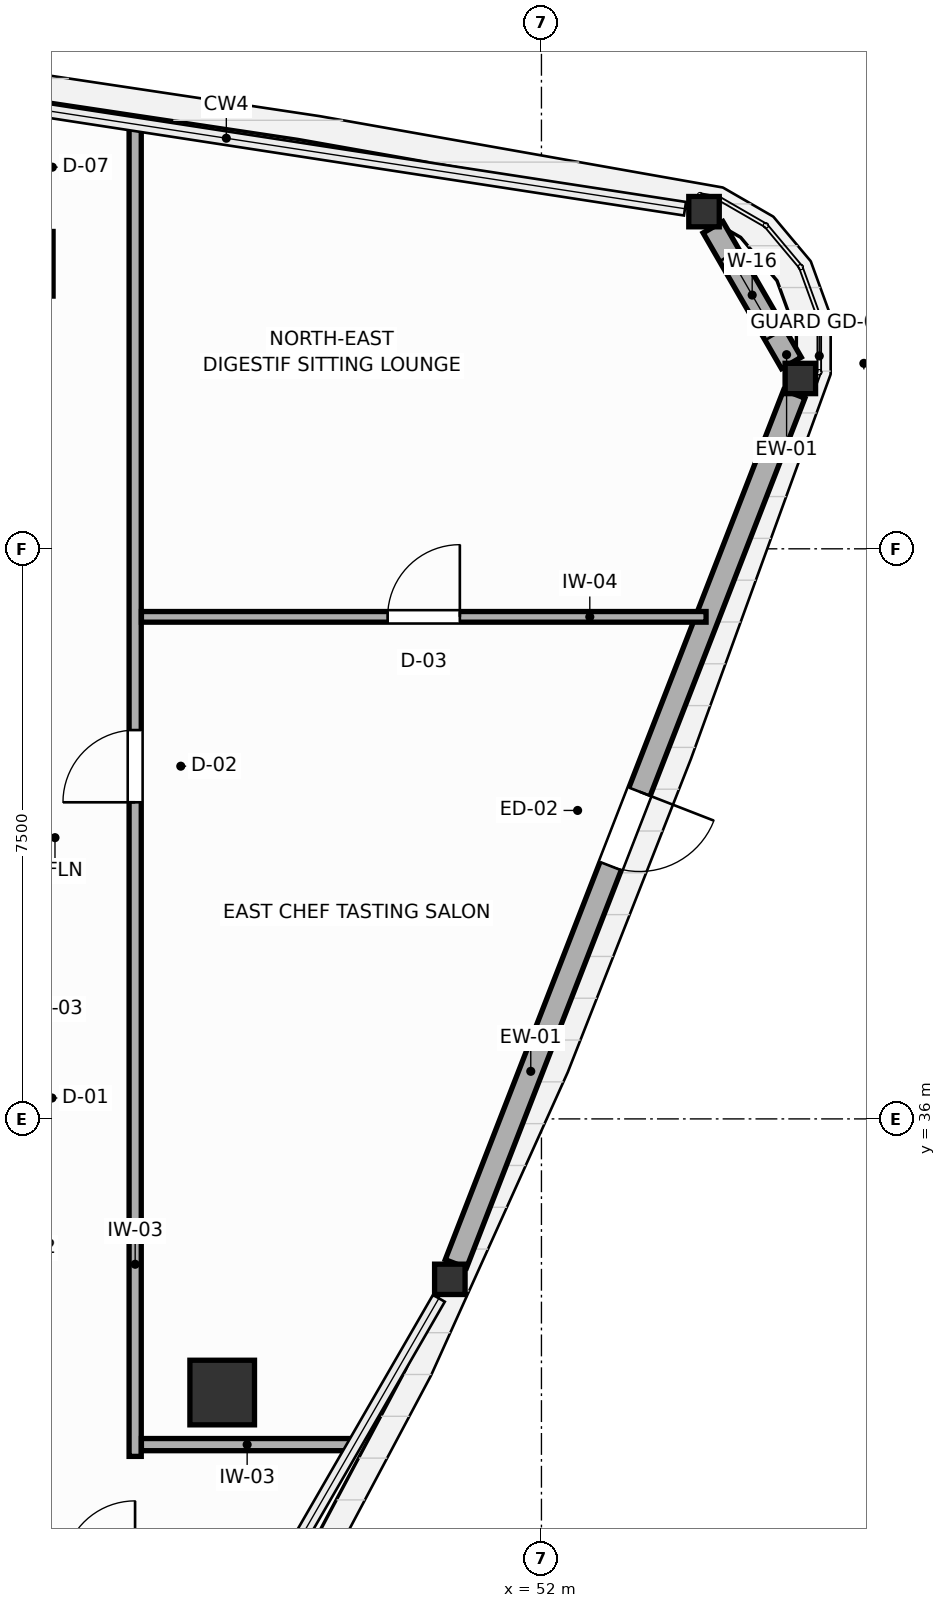
"""IFC4 building model, lengths in metres.
Left out: names, types, materials, properties, quantities, classifications, styles, units other than length and angle.
Written with IfcOpenShell. Run it as: python <this file> out.ifc"""

import sys

from ifc_helpers import new_model, si_unit, direction, frame, frame_2d, origin, origin_2d, place, context, subcontext, project, spatial, rectangle, i_section, extrude, source, transform, mapped, element, fill, save


model = new_model("IFC4")
c1 = context("Model", 3, precision=1e-05, world=origin(), true_north=direction((0.0, 1.0)))
c2 = subcontext(c1, "Body", "Model", "MODEL_VIEW")
j1 = project(units=[si_unit("LENGTHUNIT", "METRE"), si_unit("PLANEANGLEUNIT", "RADIAN")], contexts=[c1])
p1 = place(None, origin())
s1 = spatial("IfcSite", under=j1, at=p1, CompositionType="ELEMENT")
p2 = place(p1, origin())
s2 = spatial("IfcBuilding", under=s1, at=p2, CompositionType="ELEMENT")
p3 = place(p2, frame((0.0, 0.0, 279.6)))
s3 = spatial("IfcBuildingStorey", under=s2, at=p3, CompositionType="ELEMENT", Elevation=279.6)
m1 = source(origin(), c2, "Body", "SweptSolid", [
    extrude(rectangle(XDim=0.85, YDim=0.85, at=origin_2d()), origin(), (0.0, 0.0, 1.0), 4.2),
])
for number, where, z_axis, x_axis in (
    (1, (45.15, 47.25, 0.0), (0.0, 0.0, 1.0), (1.0, 0.0, 0.0)),
    (2, (47.8, 32.4, 0.0), (0.0, 0.0, 1.0), (1.0, 0.0, 0.0)),
):
    element("IfcColumn", number, at=place(p3, frame(where, z_axis=z_axis, x_axis=x_axis)), inside=s3, PredefinedType="COLUMN", context=c2, shape_type="MappedRepresentation", body=[
        mapped(m1, transform((0.0, 0.0, 0.0), scale=1.0)),
    ])
m2 = source(origin(), c2, "Body", "SweptSolid", [
    extrude(i_section(OverallWidth=0.401, OverallDepth=0.399, WebThickness=0.022, FlangeThickness=0.036, FilletRadius=0.015, at=origin_2d()), origin(), (0.0, 0.0, 1.0), 4.2),
])
for number, where, z_axis, x_axis in (
    (3, (55.406, 45.741, 0.0), (0.0, 0.0, 1.0), (1.0, 0.0, 0.0)),
    (4, (54.139, 47.936, 0.0), (0.0, 0.0, 1.0), (1.0, 0.0, 0.0)),
    (5, (50.795, 33.889, 0.0), (0.0, 0.0, 1.0), (1.0, 0.0, 0.0)),
):
    element("IfcColumn", number, at=place(p3, frame(where, z_axis=z_axis, x_axis=x_axis)), inside=s3, PredefinedType="COLUMN", context=c2, shape_type="MappedRepresentation", body=[
        mapped(m2, transform((0.0, 0.0, 0.0), scale=1.0)),
    ])
p4 = place(p3, frame((55.288, 45.945, 0.0), z_axis=(0.0, 0.0, 1.0), x_axis=(-0.499883026796, 0.866092927763, 0.0)))
e6 = element("IfcWall", 6, at=p4, inside=s3, PredefinedType="SOLIDWALL", context=c2, shape_type="SweptSolid", body=[
    extrude(rectangle(XDim=2.062, YDim=0.3, at=frame_2d((1.031, 0.0))), origin(), (0.0, 0.0, 1.0), 2.52),
])
p5 = place(p4, frame((0.431, 0.0, 0.75)))
e7 = element("IfcOpeningElement", 7, at=p5, cuts=e6, PredefinedType="OPENING", context=c2, shape_type="SweptSolid", body=[
    extrude(rectangle(XDim=1.2, YDim=1.55, at=frame_2d((0.6, 0.775))), frame((0.0, 0.16, 0.0), z_axis=(0.0, -1.0, 0.0), x_axis=(1.0, 0.0, 0.0)), (0.0, 0.0, 1.0), 0.32),
])
p6 = place(p3, frame((50.874, 34.094, 0.0), z_axis=(0.0, 0.0, 1.0), x_axis=(0.362611301042, 0.931940472539, 0.0)))
e8 = element("IfcWall", 8, at=p6, inside=s3, PredefinedType="SOLIDWALL", context=c2, shape_type="SweptSolid", body=[
    extrude(rectangle(XDim=12.278, YDim=0.3, at=frame_2d((6.139, 0.0))), origin(), (0.0, 0.0, 1.0), 2.52),
])
p7 = place(p6, frame((5.614, 0.0, 0.0)))
e9 = element("IfcOpeningElement", 9, at=p7, cuts=e8, PredefinedType="OPENING", context=c2, shape_type="SweptSolid", body=[
    extrude(rectangle(XDim=1.05, YDim=2.1, at=frame_2d((0.525, 1.05))), frame((0.0, 0.16, 0.0), z_axis=(0.0, -1.0, 0.0), x_axis=(1.0, 0.0, 0.0)), (0.0, 0.0, 1.0), 0.32),
])
p8 = place(p3, frame((46.655, 31.56, 0.0), z_axis=(0.0, 0.0, 1.0), x_axis=(0.0, 1.0, 0.0)))
e10 = element("IfcWall", 10, at=p8, inside=s3, PredefinedType="PARTITIONING", context=c2, shape_type="SweptSolid", body=[
    extrude(rectangle(XDim=17.506, YDim=0.16, at=frame_2d((8.753, 0.0))), origin(), (0.0, 0.0, 1.0), 3.96),
])
p9 = place(p8, frame((8.605, 0.0, 0.0)))
e11 = element("IfcOpeningElement", 11, at=p9, cuts=e10, PredefinedType="OPENING", context=c2, shape_type="SweptSolid", body=[
    extrude(rectangle(XDim=0.95, YDim=2.05, at=frame_2d((0.475, 1.025))), frame((0.0, 0.09, 0.0), z_axis=(0.0, -1.0, 0.0), x_axis=(1.0, 0.0, 0.0)), (0.0, 0.0, 1.0), 0.18),
])
p10 = place(p3, frame((46.737, 31.715, 0.0), z_axis=(0.0, 0.0, 1.0), x_axis=(1.0, 0.0, 0.0)))
e12 = element("IfcWall", 12, at=p10, inside=s3, PredefinedType="PARTITIONING", context=c2, shape_type="SweptSolid", body=[
    extrude(rectangle(XDim=2.782, YDim=0.16, at=frame_2d((1.391, 0.0))), origin(), (0.0, 0.0, 1.0), 3.96),
])
p11 = place(p3, frame((46.737, 42.605, 0.0), z_axis=(0.0, 0.0, 1.0), x_axis=(1.0, 0.0, 0.0)))
e13 = element("IfcWall", 13, at=p11, inside=s3, PredefinedType="PARTITIONING", context=c2, shape_type="SweptSolid", body=[
    extrude(rectangle(XDim=7.429, YDim=0.14, at=frame_2d((3.714, 0.0))), origin(), (0.0, 0.0, 1.0), 3.96),
])
p12 = place(p11, frame((3.24, 0.0, 0.0)))
e14 = element("IfcOpeningElement", 14, at=p12, cuts=e13, PredefinedType="OPENING", context=c2, shape_type="SweptSolid", body=[
    extrude(rectangle(XDim=0.95, YDim=2.05, at=frame_2d((0.475, 1.025))), frame((0.0, 0.08, 0.0), z_axis=(0.0, -1.0, 0.0), x_axis=(1.0, 0.0, 0.0)), (0.0, 0.0, 1.0), 0.16),
])
p13 = place(p5, origin())
e15 = element("IfcWindow", 15, at=p13, inside=s3, PartitioningType="SINGLE_PANEL", PredefinedType="WINDOW", context=c2, shape_type="SweptSolid", body=[
    extrude(rectangle(XDim=1.2, YDim=1.55, at=frame_2d((0.6, 0.775))), frame((0.0, 0.03, 0.0), z_axis=(0.0, -1.0, 0.0), x_axis=(1.0, 0.0, 0.0)), (0.0, 0.0, 1.0), 0.06),
])
fill(e7, e15)
p14 = place(p7, frame((1.05, 0.0, 0.0), z_axis=(0.0, 0.0, 1.0), x_axis=(-1.0, 0.0, 0.0)))
e16 = element("IfcDoor", 16, at=p14, inside=s3, OperationType="SINGLE_SWING_LEFT", PredefinedType="DOOR", context=c2, shape_type="SweptSolid", body=[
    extrude(rectangle(XDim=1.05, YDim=2.1, at=frame_2d((0.525, 1.05))), frame((0.0, 0.025, 0.0), z_axis=(0.0, -1.0, 0.0), x_axis=(1.0, 0.0, 0.0)), (0.0, 0.0, 1.0), 0.05),
])
fill(e9, e16)
p15 = place(p9, origin())
e17 = element("IfcDoor", 17, at=p15, inside=s3, OperationType="SINGLE_SWING_LEFT", PredefinedType="DOOR", context=c2, shape_type="SweptSolid", body=[
    extrude(rectangle(XDim=0.95, YDim=2.05, at=frame_2d((0.475, 1.025))), frame((0.0, 0.025, 0.0), z_axis=(0.0, -1.0, 0.0), x_axis=(1.0, 0.0, 0.0)), (0.0, 0.0, 1.0), 0.05),
])
fill(e11, e17)
p16 = place(p12, origin())
e18 = element("IfcDoor", 18, at=p16, inside=s3, OperationType="SINGLE_SWING_RIGHT", PredefinedType="DOOR", context=c2, shape_type="SweptSolid", body=[
    extrude(rectangle(XDim=0.95, YDim=2.05, at=frame_2d((0.475, 1.025))), frame((0.0, 0.025, 0.0), z_axis=(0.0, -1.0, 0.0), x_axis=(1.0, 0.0, 0.0)), (0.0, 0.0, 1.0), 0.05),
])
fill(e14, e18)
save(model, sys.argv[1])
